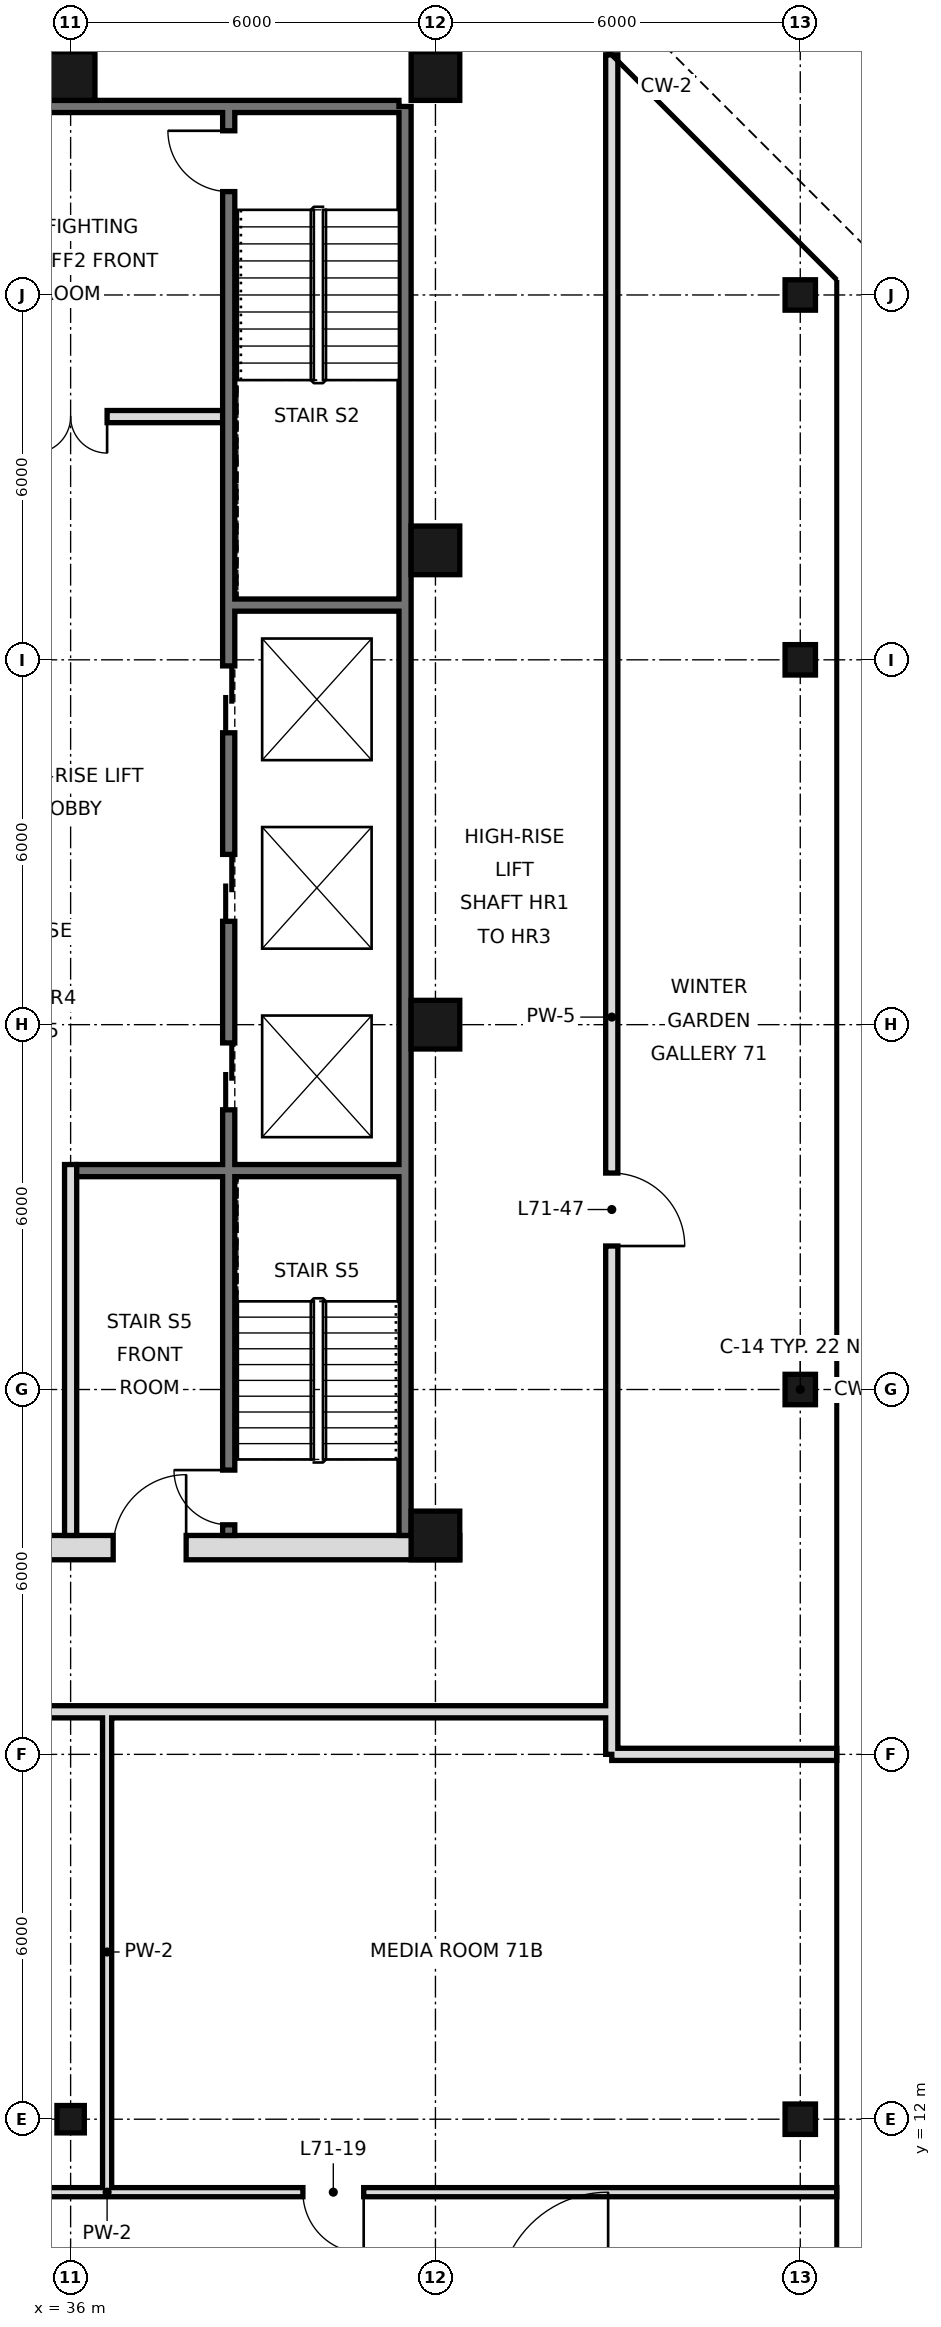
"""IFC4 building model, lengths in metres.
Left out: names, types, materials, properties, quantities, classifications, styles, units other than length and angle.
Written with IfcOpenShell. Run it as: python <this file> out.ifc"""

import sys

from ifc_helpers import new_model, si_unit, direction, frame, frame_2d, origin, origin_2d, place, context, subcontext, project, spatial, rectangle, hollow_rectangle, extrude, element, fill, save


model = new_model("IFC4")
c1 = context("Model", 3, precision=1e-05, world=origin(), true_north=direction((0.0, 1.0)))
c2 = subcontext(c1, "Body", "Model", "MODEL_VIEW")
j1 = project(units=[si_unit("LENGTHUNIT", "METRE"), si_unit("PLANEANGLEUNIT", "RADIAN")], contexts=[c1])
p1 = place(None, origin())
s1 = spatial("IfcSite", under=j1, at=p1, CompositionType="ELEMENT")
p2 = place(p1, origin())
s2 = spatial("IfcBuilding", under=s1, at=p2, CompositionType="ELEMENT")
p3 = place(p2, frame((0.0, 0.0, 301.6)))
s3 = spatial("IfcBuildingStorey", under=s2, at=p3, CompositionType="ELEMENT", Elevation=301.6)
p4 = place(p3, frame((36.0, 12.0, 0.0), z_axis=(0.0, 0.0, 1.0), x_axis=(1.0, 0.0, 0.0)))
e1 = element("IfcColumn", 1, at=p4, inside=s3, PredefinedType="COLUMN", context=c2, shape_type="SweptSolid", body=[
    extrude(hollow_rectangle(XDim=0.45, YDim=0.45, WallThickness=0.022, at=origin_2d()), origin(), (0.0, 0.0, 1.0), 3.6),
])
for number, where, z_axis, x_axis in (
    (2, (36.0, 45.6, 0.0), (0.0, 0.0, 1.0), (1.0, 0.0, 0.0)),
    (3, (42.0, 21.6, 0.0), (0.0, 0.0, 1.0), (1.0, 0.0, 0.0)),
    (4, (42.0, 30.0, 0.0), (0.0, 0.0, 1.0), (1.0, 0.0, 0.0)),
    (5, (42.0, 37.8, 0.0), (0.0, 0.0, 1.0), (1.0, 0.0, 0.0)),
    (6, (42.0, 45.6, 0.0), (0.0, 0.0, 1.0), (1.0, 0.0, 0.0)),
):
    element("IfcColumn", number, at=place(p3, frame(where, z_axis=z_axis, x_axis=x_axis)), inside=s3, PredefinedType="COLUMN", context=c2, shape_type="SweptSolid", body=[
        extrude(hollow_rectangle(XDim=0.8, YDim=0.8, WallThickness=0.025, at=origin_2d()), origin(), (0.0, 0.0, 1.0), 3.6),
    ])
for number, where, z_axis, x_axis in (
    (7, (48.0, 12.0, 0.0), (0.0, 0.0, 1.0), (1.0, 0.0, 0.0)),
    (8, (48.0, 24.0, 0.0), (0.0, 0.0, 1.0), (1.0, 0.0, 0.0)),
    (9, (48.0, 36.0, 0.0), (0.0, 0.0, 1.0), (1.0, 0.0, 0.0)),
    (10, (48.0, 42.0, 0.0), (0.0, 0.0, 1.0), (1.0, 0.0, 0.0)),
):
    element("IfcColumn", number, at=place(p3, frame(where, z_axis=z_axis, x_axis=x_axis)), inside=s3, PredefinedType="COLUMN", context=c2, shape_type="SweptSolid", body=[
        extrude(hollow_rectangle(XDim=0.5, YDim=0.5, WallThickness=0.025, at=origin_2d()), origin(), (0.0, 0.0, 1.0), 3.6),
    ])
p5 = place(p3, frame((36.6, 10.8, 0.0), z_axis=(0.0, 0.0, 1.0), x_axis=(0.0, 1.0, 0.0)))
e11 = element("IfcWall", 11, at=p5, inside=s3, PredefinedType="PARTITIONING", context=c2, shape_type="SweptSolid", body=[
    extrude(rectangle(XDim=7.9, YDim=0.15, at=frame_2d((3.95, 0.0))), origin(), (0.0, 0.0, 1.0), 3.42),
])
p6 = place(p3, frame((44.9, 18.0, 0.0), z_axis=(0.0, 0.0, 1.0), x_axis=(0.0, 1.0, 0.0)))
e12 = element("IfcWall", 12, at=p6, inside=s3, PredefinedType="SOLIDWALL", context=c2, shape_type="SweptSolid", body=[
    extrude(rectangle(XDim=27.949, YDim=0.2, at=frame_2d((13.975, 0.0))), origin(), (0.0, 0.0, 1.0), 2.97),
])
p7 = place(p6, frame((8.36, 0.0, 0.0)))
e13 = element("IfcOpeningElement", 13, at=p7, cuts=e12, PredefinedType="OPENING", context=c2, shape_type="SweptSolid", body=[
    extrude(rectangle(XDim=1.2, YDim=2.4, at=frame_2d((0.6, 1.2))), frame((0.0, 0.11, 0.0), z_axis=(0.0, -1.0, 0.0), x_axis=(1.0, 0.0, 0.0)), (0.0, 0.0, 1.0), 0.22),
])
p8 = place(p3, frame((24.6, 10.8, 0.0), z_axis=(0.0, 0.0, 1.0), x_axis=(1.0, 0.0, 0.0)))
e14 = element("IfcWall", 14, at=p8, inside=s3, PredefinedType="PARTITIONING", context=c2, shape_type="SweptSolid", body=[
    extrude(rectangle(XDim=24.0, YDim=0.15, at=frame_2d((12.0, 0.0))), origin(), (0.0, 0.0, 1.0), 3.42),
])
p9 = place(p8, frame((5.5, 0.0, 0.0)))
e15 = element("IfcOpeningElement", 15, at=p9, cuts=e14, PredefinedType="OPENING", context=c2, shape_type="SweptSolid", body=[
    extrude(rectangle(XDim=1.0, YDim=2.4, at=frame_2d((0.5, 1.2))), frame((0.0, 0.085, 0.0), z_axis=(0.0, -1.0, 0.0), x_axis=(1.0, 0.0, 0.0)), (0.0, 0.0, 1.0), 0.17),
])
p10 = place(p8, frame((15.22, 0.0, 0.0)))
e16 = element("IfcOpeningElement", 16, at=p10, cuts=e14, PredefinedType="OPENING", context=c2, shape_type="SweptSolid", body=[
    extrude(rectangle(XDim=1.0, YDim=2.4, at=frame_2d((0.5, 1.2))), frame((0.0, 0.085, 0.0), z_axis=(0.0, -1.0, 0.0), x_axis=(1.0, 0.0, 0.0)), (0.0, 0.0, 1.0), 0.17),
])
p11 = place(p3, frame((44.9, 18.0, 0.0), z_axis=(0.0, 0.0, 1.0), x_axis=(1.0, 0.0, 0.0)))
e17 = element("IfcWall", 17, at=p11, inside=s3, PredefinedType="SOLIDWALL", context=c2, shape_type="SweptSolid", body=[
    extrude(rectangle(XDim=3.7, YDim=0.2, at=frame_2d((1.85, 0.0))), origin(), (0.0, 0.0, 1.0), 2.72),
])
p12 = place(p3, frame((24.6, 18.7, 0.0), z_axis=(0.0, 0.0, 1.0), x_axis=(1.0, 0.0, 0.0)))
e18 = element("IfcWall", 18, at=p12, inside=s3, PredefinedType="SOLIDWALL", context=c2, shape_type="SweptSolid", body=[
    extrude(rectangle(XDim=20.3, YDim=0.2, at=frame_2d((10.15, 0.0))), origin(), (0.0, 0.0, 1.0), 2.72),
])
p13 = place(p3, frame((41.5, 21.6, 0.0), z_axis=(0.0, 0.0, 1.0), x_axis=(0.0, 1.0, 0.0)))
e19 = element("IfcWall", 19, at=p13, inside=s3, PredefinedType="SOLIDWALL", context=c2, shape_type="SweptSolid", body=[
    extrude(rectangle(XDim=23.5, YDim=0.2, at=frame_2d((11.75, 0.0))), origin(), (0.0, 0.0, 1.0), 3.42),
])
p14 = place(p3, frame((6.6, 45.1, 0.0), z_axis=(0.0, 0.0, 1.0), x_axis=(1.0, 0.0, 0.0)))
e20 = element("IfcWall", 20, at=p14, inside=s3, PredefinedType="SOLIDWALL", context=c2, shape_type="SweptSolid", body=[
    extrude(rectangle(XDim=34.8, YDim=0.2, at=frame_2d((17.4, 0.0))), origin(), (0.0, 0.0, 1.0), 3.42),
])
p15 = place(p3, frame((5.6, 21.4, 0.0), z_axis=(0.0, 0.0, 1.0), x_axis=(1.0, 0.0, 0.0)))
e21 = element("IfcWall", 21, at=p15, inside=s3, PredefinedType="SOLIDWALL", context=c2, shape_type="SweptSolid", body=[
    extrude(rectangle(XDim=36.8, YDim=0.4, at=frame_2d((18.4, 0.0))), origin(), (0.0, 0.0, 1.0), 3.42),
])
p16 = place(p15, frame((8.5, 0.0, 0.0)))
e22 = element("IfcOpeningElement", 22, at=p16, cuts=e21, PredefinedType="OPENING", context=c2, shape_type="SweptSolid", body=[
    extrude(rectangle(XDim=1.8, YDim=2.1, at=frame_2d((0.9, 1.05))), frame((0.0, 0.21, 0.0), z_axis=(0.0, -1.0, 0.0), x_axis=(1.0, 0.0, 0.0)), (0.0, 0.0, 1.0), 0.42),
])
p17 = place(p15, frame((17.5, 0.0, 0.0)))
e23 = element("IfcOpeningElement", 23, at=p17, cuts=e21, PredefinedType="OPENING", context=c2, shape_type="SweptSolid", body=[
    extrude(rectangle(XDim=1.8, YDim=2.1, at=frame_2d((0.9, 1.05))), frame((0.0, 0.21, 0.0), z_axis=(0.0, -1.0, 0.0), x_axis=(1.0, 0.0, 0.0)), (0.0, 0.0, 1.0), 0.42),
])
p18 = place(p15, frame((26.5, 0.0, 0.0)))
e24 = element("IfcOpeningElement", 24, at=p18, cuts=e21, PredefinedType="OPENING", context=c2, shape_type="SweptSolid", body=[
    extrude(rectangle(XDim=1.8, YDim=2.1, at=frame_2d((0.9, 1.05))), frame((0.0, 0.21, 0.0), z_axis=(0.0, -1.0, 0.0), x_axis=(1.0, 0.0, 0.0)), (0.0, 0.0, 1.0), 0.42),
])
p19 = place(p15, frame((4.5, 0.0, 0.0)))
e25 = element("IfcOpeningElement", 25, at=p19, cuts=e21, PredefinedType="OPENING", context=c2, shape_type="SweptSolid", body=[
    extrude(rectangle(XDim=1.2, YDim=2.1, at=frame_2d((0.6, 1.05))), frame((0.0, 0.21, 0.0), z_axis=(0.0, -1.0, 0.0), x_axis=(1.0, 0.0, 0.0)), (0.0, 0.0, 1.0), 0.42),
])
p20 = place(p15, frame((31.1, 0.0, 0.0)))
e26 = element("IfcOpeningElement", 26, at=p20, cuts=e21, PredefinedType="OPENING", context=c2, shape_type="SweptSolid", body=[
    extrude(rectangle(XDim=1.2, YDim=2.1, at=frame_2d((0.6, 1.05))), frame((0.0, 0.21, 0.0), z_axis=(0.0, -1.0, 0.0), x_axis=(1.0, 0.0, 0.0)), (0.0, 0.0, 1.0), 0.42),
])
p21 = place(p3, frame((36.0, 21.6, 0.0), z_axis=(0.0, 0.0, 1.0), x_axis=(0.0, 1.0, 0.0)))
e27 = element("IfcWall", 27, at=p21, inside=s3, PredefinedType="PARTITIONING", context=c2, shape_type="SweptSolid", body=[
    extrude(rectangle(XDim=6.1, YDim=0.2, at=frame_2d((3.05, 0.0))), origin(), (0.0, 0.0, 1.0), 3.42),
])
p22 = place(p3, frame((38.6, 21.6, 0.0), z_axis=(0.0, 0.0, 1.0), x_axis=(0.0, 1.0, 0.0)))
e28 = element("IfcWall", 28, at=p22, inside=s3, PredefinedType="SOLIDWALL", context=c2, shape_type="SweptSolid", body=[
    extrude(rectangle(XDim=23.4, YDim=0.2, at=frame_2d((11.7, 0.0))), origin(), (0.0, 0.0, 1.0), 3.42),
])
p23 = place(p22, frame((7.0, 0.0, 0.0)))
e29 = element("IfcOpeningElement", 29, at=p23, cuts=e28, PredefinedType="OPENING", context=c2, shape_type="SweptSolid", body=[
    extrude(rectangle(XDim=1.1, YDim=2.1, at=frame_2d((0.55, 1.05))), frame((0.0, 0.11, 0.0), z_axis=(0.0, -1.0, 0.0), x_axis=(1.0, 0.0, 0.0)), (0.0, 0.0, 1.0), 0.22),
])
p24 = place(p22, frame((10.1, 0.0, 0.0)))
e30 = element("IfcOpeningElement", 30, at=p24, cuts=e28, PredefinedType="OPENING", context=c2, shape_type="SweptSolid", body=[
    extrude(rectangle(XDim=1.1, YDim=2.1, at=frame_2d((0.55, 1.05))), frame((0.0, 0.11, 0.0), z_axis=(0.0, -1.0, 0.0), x_axis=(1.0, 0.0, 0.0)), (0.0, 0.0, 1.0), 0.22),
])
p25 = place(p22, frame((13.2, 0.0, 0.0)))
e31 = element("IfcOpeningElement", 31, at=p25, cuts=e28, PredefinedType="OPENING", context=c2, shape_type="SweptSolid", body=[
    extrude(rectangle(XDim=1.1, YDim=2.1, at=frame_2d((0.55, 1.05))), frame((0.0, 0.11, 0.0), z_axis=(0.0, -1.0, 0.0), x_axis=(1.0, 0.0, 0.0)), (0.0, 0.0, 1.0), 0.22),
])
p26 = place(p22, frame((22.1, 0.0, 0.0)))
e32 = element("IfcOpeningElement", 32, at=p26, cuts=e28, PredefinedType="OPENING", context=c2, shape_type="SweptSolid", body=[
    extrude(rectangle(XDim=1.0, YDim=2.1, at=frame_2d((0.5, 1.05))), frame((0.0, 0.11, 0.0), z_axis=(0.0, -1.0, 0.0), x_axis=(1.0, 0.0, 0.0)), (0.0, 0.0, 1.0), 0.22),
])
p27 = place(p22, frame((0.175, 0.0, 0.0)))
e33 = element("IfcOpeningElement", 33, at=p27, cuts=e28, PredefinedType="OPENING", context=c2, shape_type="SweptSolid", body=[
    extrude(rectangle(XDim=0.9, YDim=2.1, at=frame_2d((0.45, 1.05))), frame((0.0, 0.11, 0.0), z_axis=(0.0, -1.0, 0.0), x_axis=(1.0, 0.0, 0.0)), (0.0, 0.0, 1.0), 0.22),
])
p28 = place(p3, frame((36.1, 27.6, 0.0), z_axis=(0.0, 0.0, 1.0), x_axis=(1.0, 0.0, 0.0)))
e34 = element("IfcWall", 34, at=p28, inside=s3, PredefinedType="SOLIDWALL", context=c2, shape_type="SweptSolid", body=[
    extrude(rectangle(XDim=5.3, YDim=0.2, at=frame_2d((2.65, 0.0))), origin(), (0.0, 0.0, 1.0), 3.42),
])
p29 = place(p3, frame((38.7, 36.9, 0.0), z_axis=(0.0, 0.0, 1.0), x_axis=(1.0, 0.0, 0.0)))
e35 = element("IfcWall", 35, at=p29, inside=s3, PredefinedType="SOLIDWALL", context=c2, shape_type="SweptSolid", body=[
    extrude(rectangle(XDim=2.7, YDim=0.2, at=frame_2d((1.35, 0.0))), origin(), (0.0, 0.0, 1.0), 3.42),
])
p30 = place(p3, frame((33.5, 40.0, 0.0), z_axis=(0.0, 0.0, 1.0), x_axis=(1.0, 0.0, 0.0)))
e36 = element("IfcWall", 36, at=p30, inside=s3, PredefinedType="PARTITIONING", context=c2, shape_type="SweptSolid", body=[
    extrude(rectangle(XDim=5.0, YDim=0.2, at=frame_2d((2.5, 0.0))), origin(), (0.0, 0.0, 1.0), 3.42),
])
p31 = place(p30, frame((1.9, 0.0, 0.0)))
e37 = element("IfcOpeningElement", 37, at=p31, cuts=e36, PredefinedType="OPENING", context=c2, shape_type="SweptSolid", body=[
    extrude(rectangle(XDim=1.2, YDim=2.1, at=frame_2d((0.6, 1.05))), frame((0.0, 0.11, 0.0), z_axis=(0.0, -1.0, 0.0), x_axis=(1.0, 0.0, 0.0)), (0.0, 0.0, 1.0), 0.22),
])
p32 = place(p10, origin())
e38 = element("IfcDoor", 38, at=p32, inside=s3, OperationType="SINGLE_SWING_RIGHT", PredefinedType="DOOR", context=c2, shape_type="SweptSolid", body=[
    extrude(rectangle(XDim=1.0, YDim=2.4, at=frame_2d((0.5, 1.2))), frame((0.0, 0.025, 0.0), z_axis=(0.0, -1.0, 0.0), x_axis=(1.0, 0.0, 0.0)), (0.0, 0.0, 1.0), 0.05),
])
fill(e16, e38)
p33 = place(p7, frame((1.2, 0.0, 0.0), z_axis=(0.0, 0.0, 1.0), x_axis=(-1.0, 0.0, 0.0)))
e39 = element("IfcDoor", 39, at=p33, inside=s3, OperationType="SINGLE_SWING_RIGHT", PredefinedType="DOOR", context=c2, shape_type="SweptSolid", body=[
    extrude(rectangle(XDim=1.2, YDim=2.4, at=frame_2d((0.6, 1.2))), frame((0.0, 0.025, 0.0), z_axis=(0.0, -1.0, 0.0), x_axis=(1.0, 0.0, 0.0)), (0.0, 0.0, 1.0), 0.05),
])
fill(e13, e39)
p34 = place(p20, frame((1.2, 0.0, 0.0), z_axis=(0.0, 0.0, 1.0), x_axis=(-1.0, 0.0, 0.0)))
e40 = element("IfcDoor", 40, at=p34, inside=s3, OperationType="SINGLE_SWING_LEFT", PredefinedType="DOOR", context=c2, shape_type="SweptSolid", body=[
    extrude(rectangle(XDim=1.2, YDim=2.1, at=frame_2d((0.6, 1.05))), frame((0.0, 0.025, 0.0), z_axis=(0.0, -1.0, 0.0), x_axis=(1.0, 0.0, 0.0)), (0.0, 0.0, 1.0), 0.05),
])
fill(e26, e40)
p35 = place(p31, frame((1.2, 0.0, 0.0), z_axis=(0.0, 0.0, 1.0), x_axis=(-1.0, 0.0, 0.0)))
e41 = element("IfcDoor", 41, at=p35, inside=s3, OperationType="DOUBLE_DOOR_SINGLE_SWING", PredefinedType="DOOR", context=c2, shape_type="SweptSolid", body=[
    extrude(rectangle(XDim=1.2, YDim=2.1, at=frame_2d((0.6, 1.05))), frame((0.0, 0.025, 0.0), z_axis=(0.0, -1.0, 0.0), x_axis=(1.0, 0.0, 0.0)), (0.0, 0.0, 1.0), 0.05),
])
fill(e37, e41)
p36 = place(p23, origin())
e42 = element("IfcDoor", 42, at=p36, inside=s3, OperationType="DOUBLE_DOOR_SLIDING", PredefinedType="DOOR", context=c2, shape_type="SweptSolid", body=[
    extrude(rectangle(XDim=1.1, YDim=2.1, at=frame_2d((0.55, 1.05))), frame((0.0, 0.025, 0.0), z_axis=(0.0, -1.0, 0.0), x_axis=(1.0, 0.0, 0.0)), (0.0, 0.0, 1.0), 0.05),
])
fill(e29, e42)
p37 = place(p24, origin())
e43 = element("IfcDoor", 43, at=p37, inside=s3, OperationType="DOUBLE_DOOR_SLIDING", PredefinedType="DOOR", context=c2, shape_type="SweptSolid", body=[
    extrude(rectangle(XDim=1.1, YDim=2.1, at=frame_2d((0.55, 1.05))), frame((0.0, 0.025, 0.0), z_axis=(0.0, -1.0, 0.0), x_axis=(1.0, 0.0, 0.0)), (0.0, 0.0, 1.0), 0.05),
])
fill(e30, e43)
p38 = place(p25, origin())
e44 = element("IfcDoor", 44, at=p38, inside=s3, OperationType="DOUBLE_DOOR_SLIDING", PredefinedType="DOOR", context=c2, shape_type="SweptSolid", body=[
    extrude(rectangle(XDim=1.1, YDim=2.1, at=frame_2d((0.55, 1.05))), frame((0.0, 0.025, 0.0), z_axis=(0.0, -1.0, 0.0), x_axis=(1.0, 0.0, 0.0)), (0.0, 0.0, 1.0), 0.05),
])
fill(e31, e44)
p39 = place(p26, frame((1.0, 0.0, 0.0), z_axis=(0.0, 0.0, 1.0), x_axis=(-1.0, 0.0, 0.0)))
e45 = element("IfcDoor", 45, at=p39, inside=s3, OperationType="SINGLE_SWING_LEFT", PredefinedType="DOOR", context=c2, shape_type="SweptSolid", body=[
    extrude(rectangle(XDim=1.0, YDim=2.1, at=frame_2d((0.5, 1.05))), frame((0.0, 0.025, 0.0), z_axis=(0.0, -1.0, 0.0), x_axis=(1.0, 0.0, 0.0)), (0.0, 0.0, 1.0), 0.05),
])
fill(e32, e45)
p40 = place(p27, frame((0.9, 0.0, 0.0), z_axis=(0.0, 0.0, 1.0), x_axis=(-1.0, 0.0, 0.0)))
e46 = element("IfcDoor", 46, at=p40, inside=s3, OperationType="SINGLE_SWING_LEFT", PredefinedType="DOOR", context=c2, shape_type="SweptSolid", body=[
    extrude(rectangle(XDim=0.9, YDim=2.1, at=frame_2d((0.45, 1.05))), frame((0.0, 0.025, 0.0), z_axis=(0.0, -1.0, 0.0), x_axis=(1.0, 0.0, 0.0)), (0.0, 0.0, 1.0), 0.05),
])
fill(e33, e46)
save(model, sys.argv[1])
